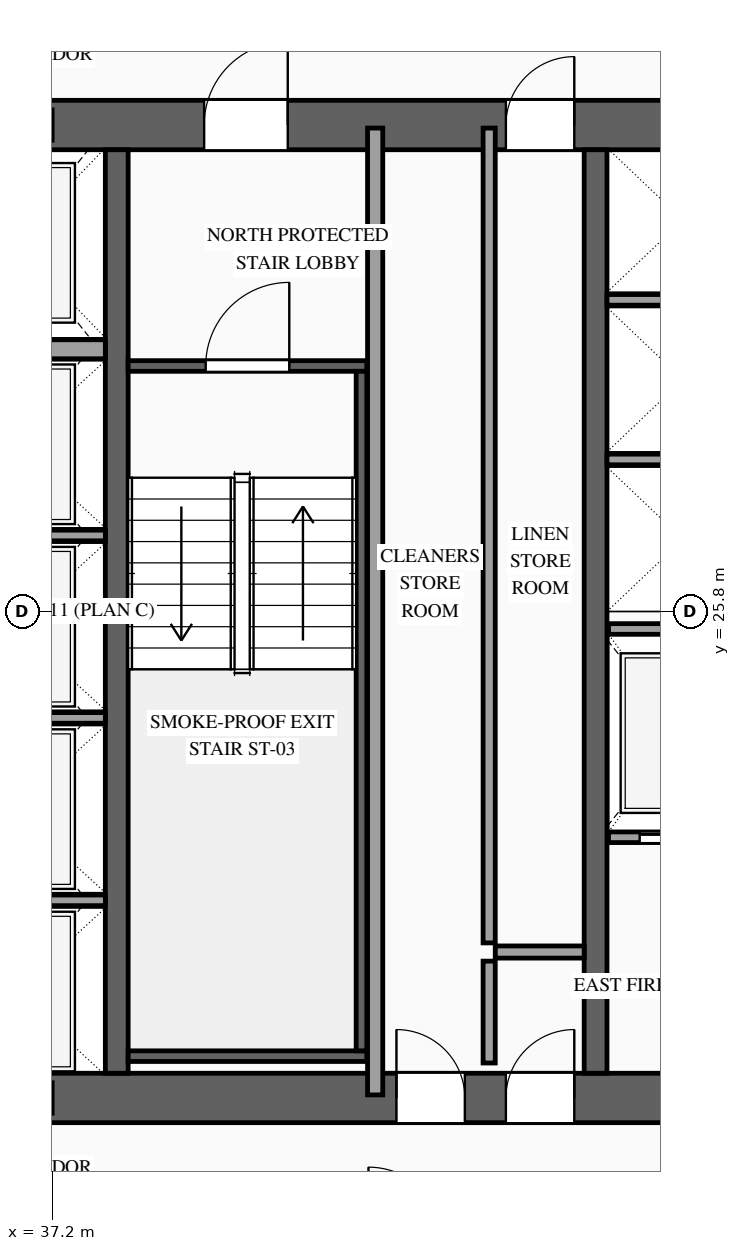
"""IFC4 building model, lengths in metres.
Left out: names, types, materials, properties, quantities, classifications, styles, units other than length and angle.
Written with IfcOpenShell. Run it as: python <this file> out.ifc"""

import sys

from ifc_helpers import new_model, si_unit, direction, frame, frame_2d, origin, place, context, subcontext, project, spatial, rectangle, extrude, source, transform, mapped, element, fill, save


model = new_model("IFC4")
c1 = context("Model", 3, precision=1e-05, world=origin(), true_north=direction((0.0, 1.0)))
c2 = subcontext(c1, "Body", "Model", "MODEL_VIEW")
j1 = project(units=[si_unit("LENGTHUNIT", "METRE"), si_unit("PLANEANGLEUNIT", "RADIAN")], contexts=[c1])
p1 = place(None, origin())
s1 = spatial("IfcSite", under=j1, at=p1, CompositionType="ELEMENT")
p2 = place(p1, origin())
s2 = spatial("IfcBuilding", under=s1, at=p2, CompositionType="ELEMENT")
p3 = place(p2, frame((0.0, 0.0, 184.5)))
s3 = spatial("IfcBuildingStorey", under=s2, at=p3, CompositionType="ELEMENT", Elevation=184.5)
p4 = place(p3, frame((23.475, 19.4, 0.0), z_axis=(0.0, 0.0, 1.0), x_axis=(1.0, 0.0, 0.0)))
e1 = element("IfcWall", 1, at=p4, inside=s3, PredefinedType="SHEAR", context=c2, shape_type="SweptSolid", body=[
    extrude(rectangle(XDim=27.05, YDim=0.65, at=frame_2d((13.525, 0.0))), origin(), (0.0, 0.0, 1.0), 3.5),
])
p5 = place(p4, frame((1.975, 0.0, 0.0)))
e2 = element("IfcOpeningElement", 2, at=p5, cuts=e1, PredefinedType="OPENING", context=c2, shape_type="SweptSolid", body=[
    extrude(rectangle(XDim=1.1, YDim=2.2, at=frame_2d((0.55, 1.1))), frame((0.0, 0.34, 0.0), z_axis=(0.0, -1.0, 0.0), x_axis=(1.0, 0.0, 0.0)), (0.0, 0.0, 1.0), 0.68),
])
p6 = place(p4, frame((9.875, 0.0, 0.0)))
e3 = element("IfcOpeningElement", 3, at=p6, cuts=e1, PredefinedType="OPENING", context=c2, shape_type="SweptSolid", body=[
    extrude(rectangle(XDim=1.1, YDim=2.2, at=frame_2d((0.55, 1.1))), frame((0.0, 0.34, 0.0), z_axis=(0.0, -1.0, 0.0), x_axis=(1.0, 0.0, 0.0)), (0.0, 0.0, 1.0), 0.68),
])
p7 = place(p4, frame((23.075, 0.0, 0.0)))
e4 = element("IfcOpeningElement", 4, at=p7, cuts=e1, PredefinedType="OPENING", context=c2, shape_type="SweptSolid", body=[
    extrude(rectangle(XDim=1.1, YDim=2.2, at=frame_2d((0.55, 1.1))), frame((0.0, 0.34, 0.0), z_axis=(0.0, -1.0, 0.0), x_axis=(1.0, 0.0, 0.0)), (0.0, 0.0, 1.0), 0.68),
])
p8 = place(p4, frame((19.695, 0.0, 0.0)))
e5 = element("IfcOpeningElement", 5, at=p8, cuts=e1, PredefinedType="OPENING", context=c2, shape_type="SweptSolid", body=[
    extrude(rectangle(XDim=0.9, YDim=2.15, at=frame_2d((0.45, 1.075))), frame((0.0, 0.34, 0.0), z_axis=(0.0, -1.0, 0.0), x_axis=(1.0, 0.0, 0.0)), (0.0, 0.0, 1.0), 0.68),
])
p9 = place(p4, frame((18.255, 0.0, 0.0)))
e6 = element("IfcOpeningElement", 6, at=p9, cuts=e1, PredefinedType="OPENING", context=c2, shape_type="SweptSolid", body=[
    extrude(rectangle(XDim=0.9, YDim=2.15, at=frame_2d((0.45, 1.075))), frame((0.0, 0.34, 0.0), z_axis=(0.0, -1.0, 0.0), x_axis=(1.0, 0.0, 0.0)), (0.0, 0.0, 1.0), 0.68),
])
p10 = place(p3, frame((23.475, 32.2, 0.0), z_axis=(0.0, 0.0, 1.0), x_axis=(1.0, 0.0, 0.0)))
e7 = element("IfcWall", 7, at=p10, inside=s3, PredefinedType="SHEAR", context=c2, shape_type="SweptSolid", body=[
    extrude(rectangle(XDim=27.05, YDim=0.65, at=frame_2d((13.525, 0.0))), origin(), (0.0, 0.0, 1.0), 3.5),
])
p11 = place(p10, frame((4.595, 0.0, 0.0)))
e8 = element("IfcOpeningElement", 8, at=p11, cuts=e7, PredefinedType="OPENING", context=c2, shape_type="SweptSolid", body=[
    extrude(rectangle(XDim=0.9, YDim=2.15, at=frame_2d((0.45, 1.075))), frame((0.0, 0.34, 0.0), z_axis=(0.0, -1.0, 0.0), x_axis=(1.0, 0.0, 0.0)), (0.0, 0.0, 1.0), 0.68),
])
p12 = place(p10, frame((9.875, 0.0, 0.0)))
e9 = element("IfcOpeningElement", 9, at=p12, cuts=e7, PredefinedType="OPENING", context=c2, shape_type="SweptSolid", body=[
    extrude(rectangle(XDim=1.1, YDim=2.2, at=frame_2d((0.55, 1.1))), frame((0.0, 0.34, 0.0), z_axis=(0.0, -1.0, 0.0), x_axis=(1.0, 0.0, 0.0)), (0.0, 0.0, 1.0), 0.68),
])
p13 = place(p10, frame((15.725, 0.0, 0.0)))
e10 = element("IfcOpeningElement", 10, at=p13, cuts=e7, PredefinedType="OPENING", context=c2, shape_type="SweptSolid", body=[
    extrude(rectangle(XDim=1.1, YDim=2.2, at=frame_2d((0.55, 1.1))), frame((0.0, 0.34, 0.0), z_axis=(0.0, -1.0, 0.0), x_axis=(1.0, 0.0, 0.0)), (0.0, 0.0, 1.0), 0.68),
])
p14 = place(p10, frame((19.695, 0.0, 0.0)))
e11 = element("IfcOpeningElement", 11, at=p14, cuts=e7, PredefinedType="OPENING", context=c2, shape_type="SweptSolid", body=[
    extrude(rectangle(XDim=0.9, YDim=2.15, at=frame_2d((0.45, 1.075))), frame((0.0, 0.34, 0.0), z_axis=(0.0, -1.0, 0.0), x_axis=(1.0, 0.0, 0.0)), (0.0, 0.0, 1.0), 0.68),
])
m1 = source(origin(), c2, "Body", "SweptSolid", [
    extrude(rectangle(XDim=12.15, YDim=0.3, at=frame_2d((6.075, 0.0))), origin(), (0.0, 0.0, 1.0), 3.5),
])
for number, where, z_axis, x_axis in (
    (12, (38.05, 19.725, 0.0), (0.0, 0.0, 1.0), (0.0, 1.0, 0.0)),
    (13, (44.35, 19.725, 0.0), (0.0, 0.0, 1.0), (0.0, 1.0, 0.0)),
):
    element("IfcWall", number, at=place(p3, frame(where, z_axis=z_axis, x_axis=x_axis)), inside=s3, PredefinedType="SOLIDWALL", context=c2, shape_type="MappedRepresentation", body=[
        mapped(m1, transform((0.0, 0.0, 0.0), scale=1.0)),
    ])
p15 = place(p3, frame((44.52, 22.83, 0.0), z_axis=(0.0, 0.0, 1.0), x_axis=(1.0, 0.0, 0.0)))
e14 = element("IfcWall", 14, at=p15, inside=s3, PredefinedType="SOLIDWALL", context=c2, shape_type="SweptSolid", body=[
    extrude(rectangle(XDim=1.92, YDim=0.14, at=frame_2d((0.96, 0.0))), origin(), (0.0, 0.0, 1.0), 3.28),
])
p16 = place(p15, frame((0.41, 0.0, 0.0)))
e15 = element("IfcOpeningElement", 15, at=p16, cuts=e14, PredefinedType="OPENING", context=c2, shape_type="SweptSolid", body=[
    extrude(rectangle(XDim=1.1, YDim=2.2, at=frame_2d((0.55, 1.1))), frame((0.0, 0.085, 0.0), z_axis=(0.0, -1.0, 0.0), x_axis=(1.0, 0.0, 0.0)), (0.0, 0.0, 1.0), 0.17),
])
m2 = source(origin(), c2, "Body", "SweptSolid", [
    extrude(rectangle(XDim=1.92, YDim=0.14, at=frame_2d((0.96, 0.0))), origin(), (0.0, 0.0, 1.0), 3.28),
])
p17 = place(p3, frame((44.52, 25.57, 0.0), z_axis=(0.0, 0.0, 1.0), x_axis=(1.0, 0.0, 0.0)))
e16 = element("IfcWall", 16, at=p17, inside=s3, PredefinedType="SOLIDWALL", context=c2, shape_type="MappedRepresentation", body=[
    mapped(m2, transform((0.0, 0.0, 0.0), scale=1.0)),
])
m3 = source(origin(), c2, "Body", "SweptSolid", [
    extrude(rectangle(XDim=2.4, YDim=0.14, at=frame_2d((1.2, 0.0))), origin(), (0.0, 0.0, 1.0), 3.28),
])
for number, where, z_axis, x_axis in (
    (17, (35.5, 22.0, 0.0), (0.0, 0.0, 1.0), (1.0, 0.0, 0.0)),
    (18, (35.5, 24.4, 0.0), (0.0, 0.0, 1.0), (1.0, 0.0, 0.0)),
    (19, (35.5, 26.8, 0.0), (0.0, 0.0, 1.0), (1.0, 0.0, 0.0)),
):
    element("IfcWall", number, at=place(p3, frame(where, z_axis=z_axis, x_axis=x_axis)), inside=s3, PredefinedType="SOLIDWALL", context=c2, shape_type="MappedRepresentation", body=[
        mapped(m3, transform((0.0, 0.0, 0.0), scale=1.0)),
    ])
m4 = source(origin(), c2, "Body", "SweptSolid", [
    extrude(rectangle(XDim=2.4, YDim=0.25, at=frame_2d((1.2, 0.0))), origin(), (0.0, 0.0, 1.0), 3.28),
])
p18 = place(p3, frame((35.5, 29.25, 0.0), z_axis=(0.0, 0.0, 1.0), x_axis=(1.0, 0.0, 0.0)))
e20 = element("IfcWall", 20, at=p18, inside=s3, PredefinedType="SOLIDWALL", context=c2, shape_type="MappedRepresentation", body=[
    mapped(m4, transform((0.0, 0.0, 0.0), scale=1.0)),
])
m5 = source(origin(), c2, "Body", "SweptSolid", [
    extrude(rectangle(XDim=2.0, YDim=0.14, at=frame_2d((1.0, 0.0))), origin(), (0.0, 0.0, 1.0), 3.28),
])
for number, where, z_axis, x_axis in (
    (21, (44.5, 27.8, 0.0), (0.0, 0.0, 1.0), (1.0, 0.0, 0.0)),
    (22, (44.5, 29.9, 0.0), (0.0, 0.0, 1.0), (1.0, 0.0, 0.0)),
):
    element("IfcWall", number, at=place(p3, frame(where, z_axis=z_axis, x_axis=x_axis)), inside=s3, PredefinedType="SOLIDWALL", context=c2, shape_type="MappedRepresentation", body=[
        mapped(m5, transform((0.0, 0.0, 0.0), scale=1.0)),
    ])
p19 = place(p3, frame((38.2, 29.03, 0.0), z_axis=(0.0, 0.0, 1.0), x_axis=(1.0, 0.0, 0.0)))
e23 = element("IfcWall", 23, at=p19, inside=s3, PredefinedType="SOLIDWALL", context=c2, shape_type="SweptSolid", body=[
    extrude(rectangle(XDim=3.14, YDim=0.14, at=frame_2d((1.57, 0.0))), origin(), (0.0, 0.0, 1.0), 3.28),
])
p20 = place(p19, frame((1.02, 0.0, 0.0)))
e24 = element("IfcOpeningElement", 24, at=p20, cuts=e23, PredefinedType="OPENING", context=c2, shape_type="SweptSolid", body=[
    extrude(rectangle(XDim=1.1, YDim=2.2, at=frame_2d((0.55, 1.1))), frame((0.0, 0.085, 0.0), z_axis=(0.0, -1.0, 0.0), x_axis=(1.0, 0.0, 0.0)), (0.0, 0.0, 1.0), 0.17),
])
m6 = source(origin(), c2, "Body", "SweptSolid", [
    extrude(rectangle(XDim=3.14, YDim=0.14, at=frame_2d((1.57, 0.0))), origin(), (0.0, 0.0, 1.0), 3.28),
])
p21 = place(p3, frame((38.2, 19.95, 0.0), z_axis=(0.0, 0.0, 1.0), x_axis=(1.0, 0.0, 0.0)))
e25 = element("IfcWall", 25, at=p21, inside=s3, PredefinedType="SOLIDWALL", context=c2, shape_type="MappedRepresentation", body=[
    mapped(m6, transform((0.0, 0.0, 0.0), scale=1.0)),
])
m7 = source(origin(), c2, "Body", "SweptSolid", [
    extrude(rectangle(XDim=8.94, YDim=0.14, at=frame_2d((4.47, 0.0))), origin(), (0.0, 0.0, 1.0), 3.28),
])
p22 = place(p3, frame((41.27, 20.02, 0.0), z_axis=(0.0, 0.0, 1.0), x_axis=(0.0, 1.0, 0.0)))
e26 = element("IfcWall", 26, at=p22, inside=s3, PredefinedType="SOLIDWALL", context=c2, shape_type="MappedRepresentation", body=[
    mapped(m7, transform((0.0, 0.0, 0.0), scale=1.0)),
])
m8 = source(origin(), c2, "Body", "SweptSolid", [
    extrude(rectangle(XDim=1.34, YDim=0.16, at=frame_2d((0.67, 0.0))), origin(), (0.0, 0.0, 1.0), 3.28),
])
p23 = place(p3, frame((42.95, 19.86, 0.0), z_axis=(0.0, 0.0, 1.0), x_axis=(0.0, 1.0, 0.0)))
e27 = element("IfcWall", 27, at=p23, inside=s3, PredefinedType="PARTITIONING", context=c2, shape_type="MappedRepresentation", body=[
    mapped(m8, transform((0.0, 0.0, 0.0), scale=1.0)),
])
m9 = source(origin(), c2, "Body", "SweptSolid", [
    extrude(rectangle(XDim=1.17, YDim=0.16, at=frame_2d((0.585, 0.0))), origin(), (0.0, 0.0, 1.0), 3.28),
])
p24 = place(p3, frame((43.03, 21.32, 0.0), z_axis=(0.0, 0.0, 1.0), x_axis=(1.0, 0.0, 0.0)))
e28 = element("IfcWall", 28, at=p24, inside=s3, PredefinedType="PARTITIONING", context=c2, shape_type="MappedRepresentation", body=[
    mapped(m9, transform((0.0, 0.0, 0.0), scale=1.0)),
])
m10 = source(origin(), c2, "Body", "SweptSolid", [
    extrude(rectangle(XDim=12.72, YDim=0.2, at=frame_2d((6.36, 0.0))), origin(), (0.0, 0.0, 1.0), 3.28),
])
p25 = place(p3, frame((41.45, 19.44, 0.0), z_axis=(0.0, 0.0, 1.0), x_axis=(0.0, 1.0, 0.0)))
e29 = element("IfcWall", 29, at=p25, inside=s3, PredefinedType="PARTITIONING", context=c2, shape_type="MappedRepresentation", body=[
    mapped(m10, transform((0.0, 0.0, 0.0), scale=1.0)),
])
m11 = source(origin(), c2, "Body", "SweptSolid", [
    extrude(rectangle(XDim=10.72, YDim=0.16, at=frame_2d((5.36, 0.0))), origin(), (0.0, 0.0, 1.0), 3.28),
])
p26 = place(p3, frame((42.95, 21.44, 0.0), z_axis=(0.0, 0.0, 1.0), x_axis=(0.0, 1.0, 0.0)))
e30 = element("IfcWall", 30, at=p26, inside=s3, PredefinedType="PARTITIONING", context=c2, shape_type="MappedRepresentation", body=[
    mapped(m11, transform((0.0, 0.0, 0.0), scale=1.0)),
])
m12 = source(origin(), c2, "Body", "SweptSolid", [
    extrude(rectangle(XDim=1.1, YDim=2.2, at=frame_2d((0.55, 1.1))), frame((0.0, 0.025, 0.0), z_axis=(0.0, -1.0, 0.0), x_axis=(1.0, 0.0, 0.0)), (0.0, 0.0, 1.0), 0.05),
])
p27 = place(p16, origin())
e31 = element("IfcDoor", 31, at=p27, inside=s3, OperationType="SLIDING_TO_RIGHT", PredefinedType="DOOR", context=c2, shape_type="MappedRepresentation", body=[
    mapped(m12, transform((0.0, 0.0, 0.0), scale=1.0)),
])
fill(e15, e31)
m13 = source(origin(), c2, "Body", "SweptSolid", [
    extrude(rectangle(XDim=1.1, YDim=2.2, at=frame_2d((0.55, 1.1))), frame((0.0, 0.025, 0.0), z_axis=(0.0, -1.0, 0.0), x_axis=(1.0, 0.0, 0.0)), (0.0, 0.0, 1.0), 0.05),
])
p28 = place(p20, origin())
e32 = element("IfcDoor", 32, at=p28, inside=s3, OperationType="SINGLE_SWING_RIGHT", PredefinedType="DOOR", context=c2, shape_type="MappedRepresentation", body=[
    mapped(m13, transform((0.0, 0.0, 0.0), scale=1.0)),
])
fill(e24, e32)
p29 = place(p13, origin())
e33 = element("IfcDoor", 33, at=p29, inside=s3, OperationType="SINGLE_SWING_RIGHT", PredefinedType="DOOR", context=c2, shape_type="MappedRepresentation", body=[
    mapped(m13, transform((0.0, 0.0, 0.0), scale=1.0)),
])
fill(e10, e33)
m14 = source(origin(), c2, "Body", "SweptSolid", [
    extrude(rectangle(XDim=0.9, YDim=2.15, at=frame_2d((0.45, 1.075))), frame((0.0, 0.025, 0.0), z_axis=(0.0, -1.0, 0.0), x_axis=(1.0, 0.0, 0.0)), (0.0, 0.0, 1.0), 0.05),
])
p30 = place(p8, origin())
e34 = element("IfcDoor", 34, at=p30, inside=s3, OperationType="SINGLE_SWING_RIGHT", PredefinedType="DOOR", context=c2, shape_type="MappedRepresentation", body=[
    mapped(m14, transform((0.0, 0.0, 0.0), scale=1.0)),
])
fill(e5, e34)
p31 = place(p9, origin())
e35 = element("IfcDoor", 35, at=p31, inside=s3, OperationType="SINGLE_SWING_LEFT", PredefinedType="DOOR", context=c2, shape_type="MappedRepresentation", body=[
    mapped(m14, transform((0.0, 0.0, 0.0), scale=1.0)),
])
fill(e6, e35)
p32 = place(p14, origin())
e36 = element("IfcDoor", 36, at=p32, inside=s3, OperationType="SINGLE_SWING_RIGHT", PredefinedType="DOOR", context=c2, shape_type="MappedRepresentation", body=[
    mapped(m14, transform((0.0, 0.0, 0.0), scale=1.0)),
])
fill(e11, e36)
save(model, sys.argv[1])
